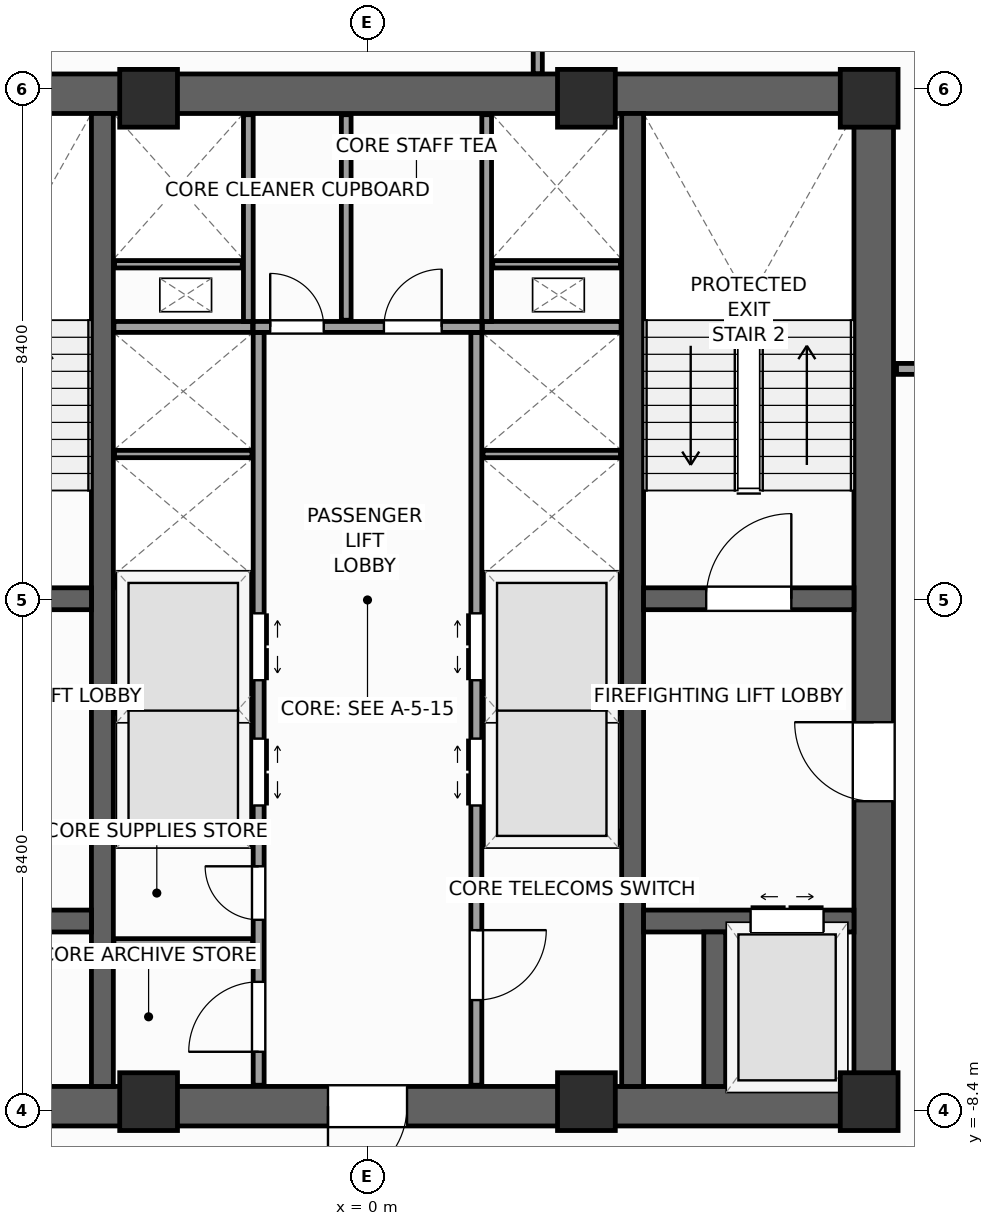
"""IFC4 building model, lengths in metres.
Left out: names, types, materials, properties, quantities, classifications, styles, units other than length and angle.
Written with IfcOpenShell. Run it as: python <this file> out.ifc"""

import sys

from ifc_helpers import new_model, si_unit, direction, frame, frame_2d, origin, origin_2d, place, context, subcontext, project, spatial, rectangle, extrude, source, transform, mapped, element, fill, save


model = new_model("IFC4")
c1 = context("Model", 3, precision=1e-05, world=origin(), true_north=direction((0.0, 1.0)))
c2 = subcontext(c1, "Body", "Model", "MODEL_VIEW")
j1 = project(units=[si_unit("LENGTHUNIT", "METRE"), si_unit("PLANEANGLEUNIT", "RADIAN")], contexts=[c1])
p1 = place(None, origin())
s1 = spatial("IfcSite", under=j1, at=p1, CompositionType="ELEMENT")
p2 = place(p1, origin())
s2 = spatial("IfcBuilding", under=s1, at=p2, CompositionType="ELEMENT")
p3 = place(p2, frame((0.0, 0.0, 192.4)))
s3 = spatial("IfcBuildingStorey", under=s2, at=p3, CompositionType="ELEMENT", Elevation=192.4)
p4 = place(p3, frame((-8.65, -8.325, 0.0), z_axis=(0.0, 0.0, 1.0), x_axis=(1.0, 0.0, 0.0)))
e1 = element("IfcWall", 1, at=p4, inside=s3, PredefinedType="SHEAR", context=c2, shape_type="SweptSolid", body=[
    extrude(rectangle(XDim=17.3, YDim=0.65, at=frame_2d((8.65, 0.0))), origin(), (0.0, 0.0, 1.0), 4.0),
])
p5 = place(p4, frame((8.0, 0.0, 0.0)))
e2 = element("IfcOpeningElement", 2, at=p5, cuts=e1, PredefinedType="OPENING", context=c2, shape_type="SweptSolid", body=[
    extrude(rectangle(XDim=1.3, YDim=2.2, at=frame_2d((0.65, 1.1))), frame((0.0, 0.335, 0.0), z_axis=(0.0, -1.0, 0.0), x_axis=(1.0, 0.0, 0.0)), (0.0, 0.0, 1.0), 0.67),
])
p6 = place(p3, frame((-8.65, 8.325, 0.0), z_axis=(0.0, 0.0, 1.0), x_axis=(1.0, 0.0, 0.0)))
e3 = element("IfcWall", 3, at=p6, inside=s3, PredefinedType="SHEAR", context=c2, shape_type="SweptSolid", body=[
    extrude(rectangle(XDim=17.3, YDim=0.65, at=frame_2d((8.65, 0.0))), origin(), (0.0, 0.0, 1.0), 4.0),
])
p7 = place(p3, frame((8.325, -8.0, 0.0), z_axis=(0.0, 0.0, 1.0), x_axis=(0.0, 1.0, 0.0)))
e4 = element("IfcWall", 4, at=p7, inside=s3, PredefinedType="SHEAR", context=c2, shape_type="SweptSolid", body=[
    extrude(rectangle(XDim=16.0, YDim=0.65, at=frame_2d((8.0, 0.0))), origin(), (0.0, 0.0, 1.0), 4.0),
])
p8 = place(p7, frame((4.69, 0.0, 0.0)))
e5 = element("IfcOpeningElement", 5, at=p8, cuts=e4, PredefinedType="OPENING", context=c2, shape_type="SweptSolid", body=[
    extrude(rectangle(XDim=1.3, YDim=2.2, at=frame_2d((0.65, 1.1))), frame((0.0, 0.335, 0.0), z_axis=(0.0, -1.0, 0.0), x_axis=(1.0, 0.0, 0.0)), (0.0, 0.0, 1.0), 0.67),
])
for number, where, z_axis, x_axis in (
    (6, (-4.36, -8.0, 0.0), (0.0, 0.0, 1.0), (0.0, 1.0, 0.0)),
    (7, (4.36, -8.0, 0.0), (0.0, 0.0, 1.0), (0.0, 1.0, 0.0)),
):
    element("IfcWall", number, at=place(p3, frame(where, z_axis=z_axis, x_axis=x_axis)), inside=s3, PredefinedType="SHEAR", context=c2, shape_type="SweptSolid", body=[
        extrude(rectangle(XDim=16.0, YDim=0.36, at=frame_2d((8.0, 0.0))), origin(), (0.0, 0.0, 1.0), 4.0),
    ])
p9 = place(p3, frame((-8.0, 0.02, 0.0), z_axis=(0.0, 0.0, 1.0), x_axis=(1.0, 0.0, 0.0)))
e8 = element("IfcWall", 8, at=p9, inside=s3, PredefinedType="SHEAR", context=c2, shape_type="SweptSolid", body=[
    extrude(rectangle(XDim=3.46, YDim=0.36, at=frame_2d((1.73, 0.0))), origin(), (0.0, 0.0, 1.0), 4.0),
])
p10 = place(p9, frame((1.03, 0.0, 0.0)))
e9 = element("IfcOpeningElement", 9, at=p10, cuts=e8, PredefinedType="OPENING", context=c2, shape_type="SweptSolid", body=[
    extrude(rectangle(XDim=1.4, YDim=2.2, at=frame_2d((0.7, 1.1))), frame((0.0, 0.19, 0.0), z_axis=(0.0, -1.0, 0.0), x_axis=(1.0, 0.0, 0.0)), (0.0, 0.0, 1.0), 0.38),
])
p11 = place(p3, frame((4.54, 0.02, 0.0), z_axis=(0.0, 0.0, 1.0), x_axis=(1.0, 0.0, 0.0)))
e10 = element("IfcWall", 10, at=p11, inside=s3, PredefinedType="SHEAR", context=c2, shape_type="SweptSolid", body=[
    extrude(rectangle(XDim=3.46, YDim=0.36, at=frame_2d((1.73, 0.0))), origin(), (0.0, 0.0, 1.0), 4.0),
])
p12 = place(p11, frame((1.03, 0.0, 0.0)))
e11 = element("IfcOpeningElement", 11, at=p12, cuts=e10, PredefinedType="OPENING", context=c2, shape_type="SweptSolid", body=[
    extrude(rectangle(XDim=1.4, YDim=2.2, at=frame_2d((0.7, 1.1))), frame((0.0, 0.19, 0.0), z_axis=(0.0, -1.0, 0.0), x_axis=(1.0, 0.0, 0.0)), (0.0, 0.0, 1.0), 0.38),
])
p13 = place(p3, frame((-8.0, -5.28, 0.0), z_axis=(0.0, 0.0, 1.0), x_axis=(1.0, 0.0, 0.0)))
e12 = element("IfcWall", 12, at=p13, inside=s3, PredefinedType="SHEAR", context=c2, shape_type="SweptSolid", body=[
    extrude(rectangle(XDim=3.46, YDim=0.36, at=frame_2d((1.73, 0.0))), origin(), (0.0, 0.0, 1.0), 4.0),
])
p14 = place(p13, frame((0.5, 0.0, 0.0)))
e13 = element("IfcOpeningElement", 13, at=p14, cuts=e12, PredefinedType="OPENING", context=c2, shape_type="SweptSolid", body=[
    extrude(rectangle(XDim=1.2, YDim=2.25, at=frame_2d((0.6, 1.125))), frame((0.0, 0.19, 0.0), z_axis=(0.0, -1.0, 0.0), x_axis=(1.0, 0.0, 0.0)), (0.0, 0.0, 1.0), 0.38),
])
p15 = place(p3, frame((4.54, -5.28, 0.0), z_axis=(0.0, 0.0, 1.0), x_axis=(1.0, 0.0, 0.0)))
e14 = element("IfcWall", 14, at=p15, inside=s3, PredefinedType="SHEAR", context=c2, shape_type="SweptSolid", body=[
    extrude(rectangle(XDim=3.46, YDim=0.36, at=frame_2d((1.73, 0.0))), origin(), (0.0, 0.0, 1.0), 4.0),
])
p16 = place(p15, frame((1.76, 0.0, 0.0)))
e15 = element("IfcOpeningElement", 15, at=p16, cuts=e14, PredefinedType="OPENING", context=c2, shape_type="SweptSolid", body=[
    extrude(rectangle(XDim=1.2, YDim=2.25, at=frame_2d((0.6, 1.125))), frame((0.0, 0.19, 0.0), z_axis=(0.0, -1.0, 0.0), x_axis=(1.0, 0.0, 0.0)), (0.0, 0.0, 1.0), 0.38),
])
p17 = place(p3, frame((5.71, -8.0, 0.0), z_axis=(0.0, 0.0, 1.0), x_axis=(0.0, 1.0, 0.0)))
e16 = element("IfcWall", 16, at=p17, inside=s3, PredefinedType="SHEAR", context=c2, shape_type="SweptSolid", body=[
    extrude(rectangle(XDim=2.54, YDim=0.36, at=frame_2d((1.27, 0.0))), origin(), (0.0, 0.0, 1.0), 4.0),
])
m1 = source(origin(), c2, "Body", "SweptSolid", [
    extrude(rectangle(XDim=0.95, YDim=0.95, at=origin_2d()), origin(), (0.0, 0.0, 1.0), 4.0),
])
for number, where, z_axis, x_axis in (
    (17, (8.25, -8.25, 0.0), (0.0, 0.0, 1.0), (1.0, 0.0, 0.0)),
    (18, (8.25, 8.25, 0.0), (0.0, 0.0, 1.0), (1.0, 0.0, 0.0)),
    (19, (-3.6, -8.25, 0.0), (0.0, 0.0, 1.0), (1.0, 0.0, 0.0)),
    (20, (3.6, -8.25, 0.0), (0.0, 0.0, 1.0), (1.0, 0.0, 0.0)),
    (21, (-3.6, 8.25, 0.0), (0.0, 0.0, 1.0), (1.0, 0.0, 0.0)),
    (22, (3.6, 8.25, 0.0), (0.0, 0.0, 1.0), (1.0, 0.0, 0.0)),
):
    element("IfcColumn", number, at=place(p3, frame(where, z_axis=z_axis, x_axis=x_axis)), inside=s3, PredefinedType="PILASTER", context=c2, shape_type="MappedRepresentation", body=[
        mapped(m1, transform((0.0, 0.0, 0.0), scale=1.0)),
    ])
p18 = place(p3, frame((-1.79, -7.98, 0.0), z_axis=(0.0, 0.0, 1.0), x_axis=(0.0, 1.0, 0.0)))
e23 = element("IfcWall", 23, at=p18, inside=s3, PredefinedType="PARTITIONING", context=c2, shape_type="SweptSolid", body=[
    extrude(rectangle(XDim=12.38, YDim=0.18, at=frame_2d((6.19, 0.0))), origin(), (0.0, 0.0, 1.0), 3.74),
])
p19 = place(p18, frame((4.6, 0.0, 0.0)))
e24 = element("IfcOpeningElement", 24, at=p19, cuts=e23, PredefinedType="OPENING", context=c2, shape_type="SweptSolid", body=[
    extrude(rectangle(XDim=1.1, YDim=2.2, at=frame_2d((0.55, 1.1))), frame((0.0, 0.1, 0.0), z_axis=(0.0, -1.0, 0.0), x_axis=(1.0, 0.0, 0.0)), (0.0, 0.0, 1.0), 0.2),
])
p20 = place(p18, frame((6.66, 0.0, 0.0)))
e25 = element("IfcOpeningElement", 25, at=p20, cuts=e23, PredefinedType="OPENING", context=c2, shape_type="SweptSolid", body=[
    extrude(rectangle(XDim=1.1, YDim=2.2, at=frame_2d((0.55, 1.1))), frame((0.0, 0.1, 0.0), z_axis=(0.0, -1.0, 0.0), x_axis=(1.0, 0.0, 0.0)), (0.0, 0.0, 1.0), 0.2),
])
p21 = place(p18, frame((0.55, 0.0, 0.0)))
e26 = element("IfcOpeningElement", 26, at=p21, cuts=e23, PredefinedType="OPENING", context=c2, shape_type="SweptSolid", body=[
    extrude(rectangle(XDim=1.15, YDim=2.25, at=frame_2d((0.575, 1.125))), frame((0.0, 0.1, 0.0), z_axis=(0.0, -1.0, 0.0), x_axis=(1.0, 0.0, 0.0)), (0.0, 0.0, 1.0), 0.2),
])
p22 = place(p18, frame((2.72, 0.0, 0.0)))
e27 = element("IfcOpeningElement", 27, at=p22, cuts=e23, PredefinedType="OPENING", context=c2, shape_type="SweptSolid", body=[
    extrude(rectangle(XDim=0.88, YDim=2.1, at=frame_2d((0.44, 1.05))), frame((0.0, 0.1, 0.0), z_axis=(0.0, -1.0, 0.0), x_axis=(1.0, 0.0, 0.0)), (0.0, 0.0, 1.0), 0.2),
])
p23 = place(p3, frame((1.79, -7.98, 0.0), z_axis=(0.0, 0.0, 1.0), x_axis=(0.0, 1.0, 0.0)))
e28 = element("IfcWall", 28, at=p23, inside=s3, PredefinedType="PARTITIONING", context=c2, shape_type="SweptSolid", body=[
    extrude(rectangle(XDim=12.38, YDim=0.18, at=frame_2d((6.19, 0.0))), origin(), (0.0, 0.0, 1.0), 3.74),
])
p24 = place(p23, frame((4.6, 0.0, 0.0)))
e29 = element("IfcOpeningElement", 29, at=p24, cuts=e28, PredefinedType="OPENING", context=c2, shape_type="SweptSolid", body=[
    extrude(rectangle(XDim=1.1, YDim=2.2, at=frame_2d((0.55, 1.1))), frame((0.0, 0.1, 0.0), z_axis=(0.0, -1.0, 0.0), x_axis=(1.0, 0.0, 0.0)), (0.0, 0.0, 1.0), 0.2),
])
p25 = place(p23, frame((6.66, 0.0, 0.0)))
e30 = element("IfcOpeningElement", 30, at=p25, cuts=e28, PredefinedType="OPENING", context=c2, shape_type="SweptSolid", body=[
    extrude(rectangle(XDim=1.1, YDim=2.2, at=frame_2d((0.55, 1.1))), frame((0.0, 0.1, 0.0), z_axis=(0.0, -1.0, 0.0), x_axis=(1.0, 0.0, 0.0)), (0.0, 0.0, 1.0), 0.2),
])
p26 = place(p23, frame((1.4, 0.0, 0.0)))
e31 = element("IfcOpeningElement", 31, at=p26, cuts=e28, PredefinedType="OPENING", context=c2, shape_type="SweptSolid", body=[
    extrude(rectangle(XDim=1.15, YDim=2.25, at=frame_2d((0.575, 1.125))), frame((0.0, 0.1, 0.0), z_axis=(0.0, -1.0, 0.0), x_axis=(1.0, 0.0, 0.0)), (0.0, 0.0, 1.0), 0.2),
])
p27 = place(p3, frame((-1.88, 4.49, 0.0), z_axis=(0.0, 0.0, 1.0), x_axis=(1.0, 0.0, 0.0)))
e32 = element("IfcWall", 32, at=p27, inside=s3, PredefinedType="PARTITIONING", context=c2, shape_type="SweptSolid", body=[
    extrude(rectangle(XDim=3.76, YDim=0.18, at=frame_2d((1.88, 0.0))), origin(), (0.0, 0.0, 1.0), 3.74),
])
p28 = place(p27, frame((0.28, 0.0, 0.0)))
e33 = element("IfcOpeningElement", 33, at=p28, cuts=e32, PredefinedType="OPENING", context=c2, shape_type="SweptSolid", body=[
    extrude(rectangle(XDim=0.88, YDim=2.1, at=frame_2d((0.44, 1.05))), frame((0.0, 0.1, 0.0), z_axis=(0.0, -1.0, 0.0), x_axis=(1.0, 0.0, 0.0)), (0.0, 0.0, 1.0), 0.2),
])
p29 = place(p27, frame((2.15, 0.0, 0.0)))
e34 = element("IfcOpeningElement", 34, at=p29, cuts=e32, PredefinedType="OPENING", context=c2, shape_type="SweptSolid", body=[
    extrude(rectangle(XDim=0.95, YDim=2.1, at=frame_2d((0.475, 1.05))), frame((0.0, 0.1, 0.0), z_axis=(0.0, -1.0, 0.0), x_axis=(1.0, 0.0, 0.0)), (0.0, 0.0, 1.0), 0.2),
])
for number, where, z_axis, x_axis in (
    (35, (-4.17, -3.9, 0.0), (0.0, 0.0, 1.0), (1.0, 0.0, 0.0)),
    (36, (1.89, -3.9, 0.0), (0.0, 0.0, 1.0), (1.0, 0.0, 0.0)),
    (37, (-4.17, 0.3, 0.0), (0.0, 0.0, 1.0), (1.0, 0.0, 0.0)),
    (38, (1.89, 0.3, 0.0), (0.0, 0.0, 1.0), (1.0, 0.0, 0.0)),
    (39, (-4.17, 4.49, 0.0), (0.0, 0.0, 1.0), (1.0, 0.0, 0.0)),
    (40, (1.89, 4.49, 0.0), (0.0, 0.0, 1.0), (1.0, 0.0, 0.0)),
):
    element("IfcWall", number, at=place(p3, frame(where, z_axis=z_axis, x_axis=x_axis)), inside=s3, PredefinedType="PARTITIONING", context=c2, shape_type="SweptSolid", body=[
        extrude(rectangle(XDim=2.28, YDim=0.18, at=frame_2d((1.14, 0.0))), origin(), (0.0, 0.0, 1.0), 3.74),
    ])
for number, where, z_axis, x_axis in (
    (41, (-4.16, -1.8, 0.0), (0.0, 0.0, 1.0), (1.0, 0.0, 0.0)),
    (42, (1.9, -1.8, 0.0), (0.0, 0.0, 1.0), (1.0, 0.0, 0.0)),
    (43, (-4.16, 2.4, 0.0), (0.0, 0.0, 1.0), (1.0, 0.0, 0.0)),
    (44, (1.9, 2.4, 0.0), (0.0, 0.0, 1.0), (1.0, 0.0, 0.0)),
):
    element("IfcWall", number, at=place(p3, frame(where, z_axis=z_axis, x_axis=x_axis)), inside=s3, PredefinedType="PARTITIONING", context=c2, shape_type="SweptSolid", body=[
        extrude(rectangle(XDim=2.26, YDim=0.12, at=frame_2d((1.13, 0.0))), origin(), (0.0, 0.0, 1.0), 3.74),
    ])
p30 = place(p3, frame((-4.17, -5.65, 0.0), z_axis=(0.0, 0.0, 1.0), x_axis=(1.0, 0.0, 0.0)))
e45 = element("IfcWall", 45, at=p30, inside=s3, PredefinedType="PARTITIONING", context=c2, shape_type="SweptSolid", body=[
    extrude(rectangle(XDim=2.28, YDim=0.16, at=frame_2d((1.14, 0.0))), origin(), (0.0, 0.0, 1.0), 3.74),
])
for number, where, z_axis, x_axis in (
    (46, (-1.96, 4.58, 0.0), (0.0, 0.0, 1.0), (0.0, 1.0, 0.0)),
    (47, (1.96, 4.58, 0.0), (0.0, 0.0, 1.0), (0.0, 1.0, 0.0)),
):
    element("IfcWall", number, at=place(p3, frame(where, z_axis=z_axis, x_axis=x_axis)), inside=s3, PredefinedType="PARTITIONING", context=c2, shape_type="SweptSolid", body=[
        extrude(rectangle(XDim=3.4, YDim=0.16, at=frame_2d((1.7, 0.0))), origin(), (0.0, 0.0, 1.0), 3.74),
    ])
for number, where, z_axis, x_axis in (
    (48, (-4.16, 5.52, 0.0), (0.0, 0.0, 1.0), (1.0, 0.0, 0.0)),
    (49, (2.06, 5.52, 0.0), (0.0, 0.0, 1.0), (1.0, 0.0, 0.0)),
):
    element("IfcWall", number, at=place(p3, frame(where, z_axis=z_axis, x_axis=x_axis)), inside=s3, PredefinedType="PARTITIONING", context=c2, shape_type="SweptSolid", body=[
        extrude(rectangle(XDim=2.1, YDim=0.12, at=frame_2d((1.05, 0.0))), origin(), (0.0, 0.0, 1.0), 3.74),
    ])
p31 = place(p3, frame((-0.35, 4.6, 0.0), z_axis=(0.0, 0.0, 1.0), x_axis=(0.0, 1.0, 0.0)))
e50 = element("IfcWall", 50, at=p31, inside=s3, PredefinedType="PARTITIONING", context=c2, shape_type="SweptSolid", body=[
    extrude(rectangle(XDim=3.38, YDim=0.16, at=frame_2d((1.69, 0.0))), origin(), (0.0, 0.0, 1.0), 3.74),
])
p32 = place(p3, frame((8.7, 3.8, 0.0), z_axis=(0.0, 0.0, 1.0), x_axis=(1.0, 0.0, 0.0)))
e51 = element("IfcWall", 51, at=p32, inside=s3, PredefinedType="PARTITIONING", context=c2, shape_type="SweptSolid", body=[
    extrude(rectangle(XDim=3.9, YDim=0.18, at=frame_2d((1.95, 0.0))), origin(), (0.0, 0.0, 1.0), 3.74),
])
p33 = place(p32, frame((1.4, 0.0, 0.0)))
e52 = element("IfcOpeningElement", 52, at=p33, cuts=e51, PredefinedType="OPENING", context=c2, shape_type="SweptSolid", body=[
    extrude(rectangle(XDim=1.1, YDim=2.2, at=frame_2d((0.55, 1.1))), frame((0.0, 0.1, 0.0), z_axis=(0.0, -1.0, 0.0), x_axis=(1.0, 0.0, 0.0)), (0.0, 0.0, 1.0), 0.2),
])
p34 = place(p3, frame((2.8, 8.655, 0.0), z_axis=(0.0, 0.0, 1.0), x_axis=(0.0, 1.0, 0.0)))
e53 = element("IfcWall", 53, at=p34, inside=s3, PredefinedType="PARTITIONING", context=c2, shape_type="SweptSolid", body=[
    extrude(rectangle(XDim=23.362, YDim=0.15, at=frame_2d((11.681, 0.0))), origin(), (0.0, 0.0, 1.0), 3.74),
])
m2 = source(origin(), c2, "Body", "SweptSolid", [
    extrude(rectangle(XDim=1.4, YDim=2.2, at=frame_2d((0.7, 1.1))), frame((0.0, 0.025, 0.0), z_axis=(0.0, -1.0, 0.0), x_axis=(1.0, 0.0, 0.0)), (0.0, 0.0, 1.0), 0.05),
])
p35 = place(p12, origin())
e54 = element("IfcDoor", 54, at=p35, inside=s3, OperationType="SINGLE_SWING_RIGHT", PredefinedType="DOOR", context=c2, shape_type="MappedRepresentation", body=[
    mapped(m2, transform((0.0, 0.0, 0.0), scale=1.0)),
])
fill(e11, e54)
m3 = source(origin(), c2, "Body", "SweptSolid", [
    extrude(rectangle(XDim=1.3, YDim=2.2, at=frame_2d((0.65, 1.1))), frame((0.0, 0.025, 0.0), z_axis=(0.0, -1.0, 0.0), x_axis=(1.0, 0.0, 0.0)), (0.0, 0.0, 1.0), 0.05),
])
p36 = place(p8, origin())
e55 = element("IfcDoor", 55, at=p36, inside=s3, OperationType="SINGLE_SWING_RIGHT", PredefinedType="DOOR", context=c2, shape_type="MappedRepresentation", body=[
    mapped(m3, transform((0.0, 0.0, 0.0), scale=1.0)),
])
fill(e5, e55)
p37 = place(p5, frame((1.3, 0.0, 0.0), z_axis=(0.0, 0.0, 1.0), x_axis=(-1.0, 0.0, 0.0)))
e56 = element("IfcDoor", 56, at=p37, inside=s3, OperationType="SINGLE_SWING_LEFT", PredefinedType="DOOR", context=c2, shape_type="MappedRepresentation", body=[
    mapped(m3, transform((0.0, 0.0, 0.0), scale=1.0)),
])
fill(e2, e56)
m4 = source(origin(), c2, "Body", "SweptSolid", [
    extrude(rectangle(XDim=1.2, YDim=2.25, at=frame_2d((0.6, 1.125))), frame((0.0, 0.025, 0.0), z_axis=(0.0, -1.0, 0.0), x_axis=(1.0, 0.0, 0.0)), (0.0, 0.0, 1.0), 0.05),
])
p38 = place(p16, origin())
e57 = element("IfcDoor", 57, at=p38, inside=s3, OperationType="DOUBLE_DOOR_SLIDING", PredefinedType="DOOR", context=c2, shape_type="MappedRepresentation", body=[
    mapped(m4, transform((0.0, 0.0, 0.0), scale=1.0)),
])
fill(e15, e57)
m5 = source(origin(), c2, "Body", "SweptSolid", [
    extrude(rectangle(XDim=1.1, YDim=2.2, at=frame_2d((0.55, 1.1))), frame((0.0, 0.025, 0.0), z_axis=(0.0, -1.0, 0.0), x_axis=(1.0, 0.0, 0.0)), (0.0, 0.0, 1.0), 0.05),
])
p39 = place(p19, frame((1.1, 0.0, 0.0), z_axis=(0.0, 0.0, 1.0), x_axis=(-1.0, 0.0, 0.0)))
e58 = element("IfcDoor", 58, at=p39, inside=s3, OperationType="DOUBLE_DOOR_SLIDING", PredefinedType="DOOR", context=c2, shape_type="MappedRepresentation", body=[
    mapped(m5, transform((0.0, 0.0, 0.0), scale=1.0)),
])
fill(e24, e58)
p40 = place(p20, frame((1.1, 0.0, 0.0), z_axis=(0.0, 0.0, 1.0), x_axis=(-1.0, 0.0, 0.0)))
e59 = element("IfcDoor", 59, at=p40, inside=s3, OperationType="DOUBLE_DOOR_SLIDING", PredefinedType="DOOR", context=c2, shape_type="MappedRepresentation", body=[
    mapped(m5, transform((0.0, 0.0, 0.0), scale=1.0)),
])
fill(e25, e59)
p41 = place(p24, origin())
e60 = element("IfcDoor", 60, at=p41, inside=s3, OperationType="DOUBLE_DOOR_SLIDING", PredefinedType="DOOR", context=c2, shape_type="MappedRepresentation", body=[
    mapped(m5, transform((0.0, 0.0, 0.0), scale=1.0)),
])
fill(e29, e60)
p42 = place(p25, origin())
e61 = element("IfcDoor", 61, at=p42, inside=s3, OperationType="DOUBLE_DOOR_SLIDING", PredefinedType="DOOR", context=c2, shape_type="MappedRepresentation", body=[
    mapped(m5, transform((0.0, 0.0, 0.0), scale=1.0)),
])
fill(e30, e61)
m6 = source(origin(), c2, "Body", "SweptSolid", [
    extrude(rectangle(XDim=1.15, YDim=2.25, at=frame_2d((0.575, 1.125))), frame((0.0, 0.025, 0.0), z_axis=(0.0, -1.0, 0.0), x_axis=(1.0, 0.0, 0.0)), (0.0, 0.0, 1.0), 0.05),
])
p43 = place(p21, origin())
e62 = element("IfcDoor", 62, at=p43, inside=s3, OperationType="SINGLE_SWING_LEFT", PredefinedType="DOOR", context=c2, shape_type="MappedRepresentation", body=[
    mapped(m6, transform((0.0, 0.0, 0.0), scale=1.0)),
])
fill(e26, e62)
m7 = source(origin(), c2, "Body", "SweptSolid", [
    extrude(rectangle(XDim=0.88, YDim=2.1, at=frame_2d((0.44, 1.05))), frame((0.0, 0.025, 0.0), z_axis=(0.0, -1.0, 0.0), x_axis=(1.0, 0.0, 0.0)), (0.0, 0.0, 1.0), 0.05),
])
p44 = place(p22, origin())
e63 = element("IfcDoor", 63, at=p44, inside=s3, OperationType="SINGLE_SWING_RIGHT", PredefinedType="DOOR", context=c2, shape_type="MappedRepresentation", body=[
    mapped(m7, transform((0.0, 0.0, 0.0), scale=1.0)),
])
fill(e27, e63)
p45 = place(p26, frame((1.15, 0.0, 0.0), z_axis=(0.0, 0.0, 1.0), x_axis=(-1.0, 0.0, 0.0)))
e64 = element("IfcDoor", 64, at=p45, inside=s3, OperationType="SINGLE_SWING_RIGHT", PredefinedType="DOOR", context=c2, shape_type="MappedRepresentation", body=[
    mapped(m6, transform((0.0, 0.0, 0.0), scale=1.0)),
])
fill(e31, e64)
p46 = place(p28, origin())
e65 = element("IfcDoor", 65, at=p46, inside=s3, OperationType="SINGLE_SWING_LEFT", PredefinedType="DOOR", context=c2, shape_type="MappedRepresentation", body=[
    mapped(m7, transform((0.0, 0.0, 0.0), scale=1.0)),
])
fill(e33, e65)
m8 = source(origin(), c2, "Body", "SweptSolid", [
    extrude(rectangle(XDim=0.95, YDim=2.1, at=frame_2d((0.475, 1.05))), frame((0.0, 0.025, 0.0), z_axis=(0.0, -1.0, 0.0), x_axis=(1.0, 0.0, 0.0)), (0.0, 0.0, 1.0), 0.05),
])
p47 = place(p29, origin())
e66 = element("IfcDoor", 66, at=p47, inside=s3, OperationType="SINGLE_SWING_RIGHT", PredefinedType="DOOR", context=c2, shape_type="MappedRepresentation", body=[
    mapped(m8, transform((0.0, 0.0, 0.0), scale=1.0)),
])
fill(e34, e66)
save(model, sys.argv[1])
